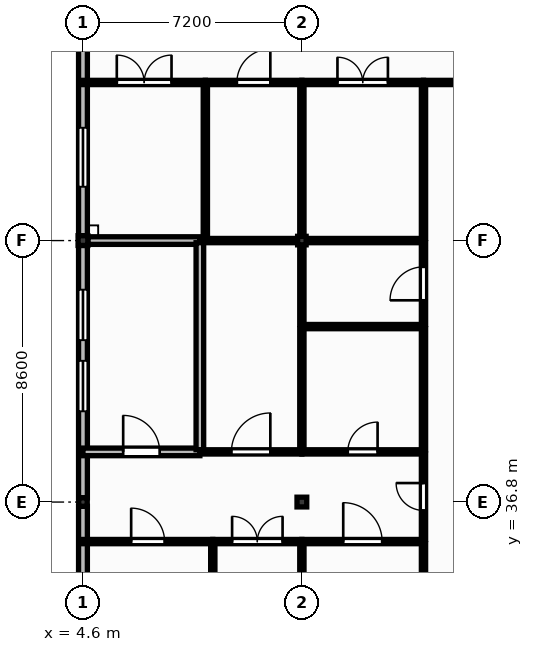
"""IFC4 building model, lengths in metres.
Left out: names, types, materials, properties, quantities, classifications, styles, units other than length and angle.
Written with IfcOpenShell. Run it as: python <this file> out.ifc"""

import sys

from ifc_helpers import new_model, si_unit, direction, frame, frame_2d, origin, origin_2d, place, context, subcontext, project, spatial, rectangle, extrude, element, fill, save


model = new_model("IFC4")
c1 = context("Model", 3, precision=1e-05, world=origin(), true_north=direction((0.0, 1.0)))
c2 = subcontext(c1, "Body", "Model", "MODEL_VIEW")
j1 = project(units=[si_unit("LENGTHUNIT", "METRE"), si_unit("PLANEANGLEUNIT", "RADIAN")], contexts=[c1])
p1 = place(None, origin())
s1 = spatial("IfcSite", under=j1, at=p1, CompositionType="ELEMENT")
p2 = place(p1, origin())
s2 = spatial("IfcBuilding", under=s1, at=p2, CompositionType="ELEMENT")
p3 = place(p2, frame((0.0, 0.0, 13.2)))
s3 = spatial("IfcBuildingStorey", under=s2, at=p3, CompositionType="ELEMENT", Elevation=13.2)
p4 = place(p3, frame((4.6, 36.8, 0.0), z_axis=(0.0, 0.0, 1.0), x_axis=(1.0, 0.0, 0.0)))
e1 = element("IfcColumn", 1, at=p4, inside=s3, PredefinedType="COLUMN", context=c2, shape_type="SweptSolid", body=[
    extrude(rectangle(XDim=0.28, YDim=0.28, at=origin_2d()), origin(), (0.0, 0.0, 1.0), 3.95),
])
p5 = place(p3, frame((4.6, 45.4, 0.0), z_axis=(0.0, 0.0, 1.0), x_axis=(1.0, 0.0, 0.0)))
e2 = element("IfcColumn", 2, at=p5, inside=s3, PredefinedType="COLUMN", context=c2, shape_type="SweptSolid", body=[
    extrude(rectangle(XDim=0.32, YDim=0.32, at=origin_2d()), origin(), (0.0, 0.0, 1.0), 3.98),
])
p6 = place(p3, frame((11.8, 36.8, 0.0), z_axis=(0.0, 0.0, 1.0), x_axis=(1.0, 0.0, 0.0)))
e3 = element("IfcColumn", 3, at=p6, inside=s3, PredefinedType="COLUMN", context=c2, shape_type="SweptSolid", body=[
    extrude(rectangle(XDim=0.32, YDim=0.32, at=origin_2d()), origin(), (0.0, 0.0, 1.0), 3.95),
])
p7 = place(p3, frame((11.8, 45.4, 0.0), z_axis=(0.0, 0.0, 1.0), x_axis=(1.0, 0.0, 0.0)))
e4 = element("IfcColumn", 4, at=p7, inside=s3, PredefinedType="COLUMN", context=c2, shape_type="SweptSolid", body=[
    extrude(rectangle(XDim=0.28, YDim=0.28, at=origin_2d()), origin(), (0.0, 0.0, 1.0), 3.98),
])
p8 = place(p3, frame((4.6, 27.36, 0.0), z_axis=(0.0, 0.0, 1.0), x_axis=(0.0, 1.0, 0.0)))
e5 = element("IfcWall", 5, at=p8, inside=s3, PredefinedType="SOLIDWALL", context=c2, shape_type="SweptSolid", body=[
    extrude(rectangle(XDim=9.3, YDim=0.29, at=frame_2d((4.65, 0.0))), origin(), (0.0, 0.0, 1.0), 3.49),
])
p9 = place(p8, frame((2.41, 0.0, 1.0)))
e6 = element("IfcOpeningElement", 6, at=p9, cuts=e5, PredefinedType="OPENING", context=c2, shape_type="SweptSolid", body=[
    extrude(rectangle(XDim=1.38, YDim=1.8, at=frame_2d((0.69, 0.9))), frame((0.0, 0.155, 0.0), z_axis=(0.0, -1.0, 0.0), x_axis=(1.0, 0.0, 0.0)), (0.0, 0.0, 1.0), 0.31),
])
p10 = place(p8, frame((4.47, 0.0, 1.0)))
e7 = element("IfcOpeningElement", 7, at=p10, cuts=e5, PredefinedType="OPENING", context=c2, shape_type="SweptSolid", body=[
    extrude(rectangle(XDim=1.38, YDim=1.8, at=frame_2d((0.69, 0.9))), frame((0.0, 0.155, 0.0), z_axis=(0.0, -1.0, 0.0), x_axis=(1.0, 0.0, 0.0)), (0.0, 0.0, 1.0), 0.31),
])
p11 = place(p3, frame((4.6, 36.94, 0.0), z_axis=(0.0, 0.0, 1.0), x_axis=(0.0, 1.0, 0.0)))
e8 = element("IfcWall", 8, at=p11, inside=s3, PredefinedType="SOLIDWALL", context=c2, shape_type="SweptSolid", body=[
    extrude(rectangle(XDim=8.3, YDim=0.29, at=frame_2d((4.15, 0.0))), origin(), (0.0, 0.0, 1.0), 3.49),
])
p12 = place(p11, frame((2.845, 0.0, 1.0)))
e9 = element("IfcOpeningElement", 9, at=p12, cuts=e8, PredefinedType="OPENING", context=c2, shape_type="SweptSolid", body=[
    extrude(rectangle(XDim=1.66, YDim=1.8, at=frame_2d((0.83, 0.9))), frame((0.0, 0.155, 0.0), z_axis=(0.0, -1.0, 0.0), x_axis=(1.0, 0.0, 0.0)), (0.0, 0.0, 1.0), 0.31),
])
p13 = place(p11, frame((5.185, 0.0, 1.0)))
e10 = element("IfcOpeningElement", 10, at=p13, cuts=e8, PredefinedType="OPENING", context=c2, shape_type="SweptSolid", body=[
    extrude(rectangle(XDim=1.66, YDim=1.8, at=frame_2d((0.83, 0.9))), frame((0.0, 0.155, 0.0), z_axis=(0.0, -1.0, 0.0), x_axis=(1.0, 0.0, 0.0)), (0.0, 0.0, 1.0), 0.31),
])
p14 = place(p3, frame((4.6, 45.56, 0.0), z_axis=(0.0, 0.0, 1.0), x_axis=(0.0, 1.0, 0.0)))
e11 = element("IfcWall", 11, at=p14, inside=s3, PredefinedType="SOLIDWALL", context=c2, shape_type="SweptSolid", body=[
    extrude(rectangle(XDim=6.9, YDim=0.29, at=frame_2d((3.45, 0.0))), origin(), (0.0, 0.0, 1.0), 3.52),
])
p15 = place(p14, frame((1.61, 0.0, 1.0)))
e12 = element("IfcOpeningElement", 12, at=p15, cuts=e11, PredefinedType="OPENING", context=c2, shape_type="SweptSolid", body=[
    extrude(rectangle(XDim=1.94, YDim=1.8, at=frame_2d((0.97, 0.9))), frame((0.0, 0.155, 0.0), z_axis=(0.0, -1.0, 0.0), x_axis=(1.0, 0.0, 0.0)), (0.0, 0.0, 1.0), 0.31),
])
p16 = place(p3, frame((4.6, 35.5, 0.0), z_axis=(0.0, 0.0, 1.0), x_axis=(1.0, 0.0, 0.0)))
e13 = element("IfcWall", 13, at=p16, inside=s3, PredefinedType="PARTITIONING", context=c2, shape_type="SweptSolid", body=[
    extrude(rectangle(XDim=4.27, YDim=0.14, at=frame_2d((2.135, 0.0))), origin(), (0.0, 0.0, 1.0), 3.93),
])
p17 = place(p16, frame((1.585, 0.0, 0.0)))
e14 = element("IfcOpeningElement", 14, at=p17, cuts=e13, PredefinedType="OPENING", context=c2, shape_type="SweptSolid", body=[
    extrude(rectangle(XDim=1.1, YDim=2.1, at=frame_2d((0.55, 1.05))), frame((0.0, 0.08, 0.0), z_axis=(0.0, -1.0, 0.0), x_axis=(1.0, 0.0, 0.0)), (0.0, 0.0, 1.0), 0.16),
])
p18 = place(p3, frame((4.6, 38.45, 0.0), z_axis=(0.0, 0.0, 1.0), x_axis=(1.0, 0.0, 0.0)))
e15 = element("IfcWall", 15, at=p18, inside=s3, PredefinedType="SOLIDWALL", context=c2, shape_type="SweptSolid", body=[
    extrude(rectangle(XDim=3.845, YDim=0.25, at=frame_2d((1.922, 0.0))), origin(), (0.0, 0.0, 1.0), 3.93),
])
p19 = place(p18, frame((1.323, 0.0, 0.0)))
e16 = element("IfcOpeningElement", 16, at=p19, cuts=e15, PredefinedType="OPENING", context=c2, shape_type="SweptSolid", body=[
    extrude(rectangle(XDim=1.2, YDim=2.15, at=frame_2d((0.6, 1.075))), frame((0.0, 0.135, 0.0), z_axis=(0.0, -1.0, 0.0), x_axis=(1.0, 0.0, 0.0)), (0.0, 0.0, 1.0), 0.27),
])
p20 = place(p3, frame((4.76, 45.4, 0.0), z_axis=(0.0, 0.0, 1.0), x_axis=(1.0, 0.0, 0.0)))
e17 = element("IfcWall", 17, at=p20, inside=s3, PredefinedType="SOLIDWALL", context=c2, shape_type="SweptSolid", body=[
    extrude(rectangle(XDim=3.685, YDim=0.25, at=frame_2d((1.843, 0.0))), origin(), (0.0, 0.0, 1.0), 3.52),
])
p21 = place(p3, frame((4.6, 50.6, 0.0), z_axis=(0.0, 0.0, 1.0), x_axis=(1.0, 0.0, 0.0)))
e18 = element("IfcWall", 18, at=p21, inside=s3, PredefinedType="PARTITIONING", context=c2, shape_type="SweptSolid", body=[
    extrude(rectangle(XDim=4.025, YDim=0.14, at=frame_2d((2.012, 0.0))), origin(), (0.0, 0.0, 1.0), 3.93),
])
p22 = place(p21, frame((1.113, 0.0, 0.0)))
e19 = element("IfcOpeningElement", 19, at=p22, cuts=e18, PredefinedType="OPENING", context=c2, shape_type="SweptSolid", body=[
    extrude(rectangle(XDim=1.8, YDim=2.3, at=frame_2d((0.9, 1.15))), frame((0.0, 0.08, 0.0), z_axis=(0.0, -1.0, 0.0), x_axis=(1.0, 0.0, 0.0)), (0.0, 0.0, 1.0), 0.16),
])
p23 = place(p3, frame((8.445, 38.52, 0.0), z_axis=(0.0, 0.0, 1.0), x_axis=(0.0, 1.0, 0.0)))
e20 = element("IfcWall", 20, at=p23, inside=s3, PredefinedType="SOLIDWALL", context=c2, shape_type="SweptSolid", body=[
    extrude(rectangle(XDim=6.81, YDim=0.25, at=frame_2d((3.405, 0.0))), origin(), (0.0, 0.0, 1.0), 3.93),
])
p24 = place(p3, frame((8.445, 38.45, 0.0), z_axis=(0.0, 0.0, 1.0), x_axis=(1.0, 0.0, 0.0)))
e21 = element("IfcWall", 21, at=p24, inside=s3, PredefinedType="PARTITIONING", context=c2, shape_type="SweptSolid", body=[
    extrude(rectangle(XDim=3.355, YDim=0.14, at=frame_2d((1.677, 0.0))), origin(), (0.0, 0.0, 1.0), 3.93),
])
p25 = place(p24, frame((1.038, 0.0, 0.0)))
e22 = element("IfcOpeningElement", 22, at=p25, cuts=e21, PredefinedType="OPENING", context=c2, shape_type="SweptSolid", body=[
    extrude(rectangle(XDim=1.28, YDim=2.2, at=frame_2d((0.64, 1.1))), frame((0.0, 0.08, 0.0), z_axis=(0.0, -1.0, 0.0), x_axis=(1.0, 0.0, 0.0)), (0.0, 0.0, 1.0), 0.16),
])
p26 = place(p3, frame((8.625, 45.47, 0.0), z_axis=(0.0, 0.0, 1.0), x_axis=(0.0, 1.0, 0.0)))
e23 = element("IfcWall", 23, at=p26, inside=s3, PredefinedType="PARTITIONING", context=c2, shape_type="SweptSolid", body=[
    extrude(rectangle(XDim=5.06, YDim=0.14, at=frame_2d((2.53, 0.0))), origin(), (0.0, 0.0, 1.0), 3.93),
])
p27 = place(p3, frame((8.625, 45.4, 0.0), z_axis=(0.0, 0.0, 1.0), x_axis=(1.0, 0.0, 0.0)))
e24 = element("IfcWall", 24, at=p27, inside=s3, PredefinedType="PARTITIONING", context=c2, shape_type="SweptSolid", body=[
    extrude(rectangle(XDim=3.035, YDim=0.14, at=frame_2d((1.518, 0.0))), origin(), (0.0, 0.0, 1.0), 3.52),
])
p28 = place(p3, frame((8.625, 50.6, 0.0), z_axis=(0.0, 0.0, 1.0), x_axis=(1.0, 0.0, 0.0)))
e25 = element("IfcWall", 25, at=p28, inside=s3, PredefinedType="PARTITIONING", context=c2, shape_type="SweptSolid", body=[
    extrude(rectangle(XDim=3.175, YDim=0.14, at=frame_2d((1.587, 0.0))), origin(), (0.0, 0.0, 1.0), 3.93),
])
p29 = place(p28, frame((1.038, 0.0, 0.0)))
e26 = element("IfcOpeningElement", 26, at=p29, cuts=e25, PredefinedType="OPENING", context=c2, shape_type="SweptSolid", body=[
    extrude(rectangle(XDim=1.1, YDim=2.1, at=frame_2d((0.55, 1.05))), frame((0.0, 0.08, 0.0), z_axis=(0.0, -1.0, 0.0), x_axis=(1.0, 0.0, 0.0)), (0.0, 0.0, 1.0), 0.16),
])
p30 = place(p3, frame((8.87, 27.2, 0.0), z_axis=(0.0, 0.0, 1.0), x_axis=(0.0, 1.0, 0.0)))
e27 = element("IfcWall", 27, at=p30, inside=s3, PredefinedType="PARTITIONING", context=c2, shape_type="SweptSolid", body=[
    extrude(rectangle(XDim=8.23, YDim=0.14, at=frame_2d((4.115, 0.0))), origin(), (0.0, 0.0, 1.0), 3.93),
])
p31 = place(p3, frame((8.87, 35.5, 0.0), z_axis=(0.0, 0.0, 1.0), x_axis=(1.0, 0.0, 0.0)))
e28 = element("IfcWall", 28, at=p31, inside=s3, PredefinedType="PARTITIONING", context=c2, shape_type="SweptSolid", body=[
    extrude(rectangle(XDim=2.93, YDim=0.14, at=frame_2d((1.465, 0.0))), origin(), (0.0, 0.0, 1.0), 3.93),
])
p32 = place(p31, frame((0.635, 0.0, 0.0)))
e29 = element("IfcOpeningElement", 29, at=p32, cuts=e28, PredefinedType="OPENING", context=c2, shape_type="SweptSolid", body=[
    extrude(rectangle(XDim=1.66, YDim=2.3, at=frame_2d((0.83, 1.15))), frame((0.0, 0.08, 0.0), z_axis=(0.0, -1.0, 0.0), x_axis=(1.0, 0.0, 0.0)), (0.0, 0.0, 1.0), 0.16),
])
p33 = place(p3, frame((11.8, 32.126, 0.0), z_axis=(0.0, 0.0, 1.0), x_axis=(0.0, 1.0, 0.0)))
e30 = element("IfcWall", 30, at=p33, inside=s3, PredefinedType="PARTITIONING", context=c2, shape_type="SweptSolid", body=[
    extrude(rectangle(XDim=3.304, YDim=0.14, at=frame_2d((1.652, 0.0))), origin(), (0.0, 0.0, 1.0), 3.49),
])
p34 = place(p3, frame((11.8, 35.5, 0.0), z_axis=(0.0, 0.0, 1.0), x_axis=(1.0, 0.0, 0.0)))
e31 = element("IfcWall", 31, at=p34, inside=s3, PredefinedType="PARTITIONING", context=c2, shape_type="SweptSolid", body=[
    extrude(rectangle(XDim=4.0, YDim=0.14, at=frame_2d((2.0, 0.0))), origin(), (0.0, 0.0, 1.0), 3.93),
])
p35 = place(p34, frame((1.36, 0.0, 0.0)))
e32 = element("IfcOpeningElement", 32, at=p35, cuts=e31, PredefinedType="OPENING", context=c2, shape_type="SweptSolid", body=[
    extrude(rectangle(XDim=1.28, YDim=2.2, at=frame_2d((0.64, 1.1))), frame((0.0, 0.08, 0.0), z_axis=(0.0, -1.0, 0.0), x_axis=(1.0, 0.0, 0.0)), (0.0, 0.0, 1.0), 0.16),
])
p36 = place(p3, frame((11.8, 38.52, 0.0), z_axis=(0.0, 0.0, 1.0), x_axis=(0.0, 1.0, 0.0)))
e33 = element("IfcWall", 33, at=p36, inside=s3, PredefinedType="PARTITIONING", context=c2, shape_type="SweptSolid", body=[
    extrude(rectangle(XDim=3.981, YDim=0.14, at=frame_2d((1.99, 0.0))), origin(), (0.0, 0.0, 1.0), 3.49),
])
p37 = place(p3, frame((11.8, 38.45, 0.0), z_axis=(0.0, 0.0, 1.0), x_axis=(1.0, 0.0, 0.0)))
e34 = element("IfcWall", 34, at=p37, inside=s3, PredefinedType="PARTITIONING", context=c2, shape_type="SweptSolid", body=[
    extrude(rectangle(XDim=4.0, YDim=0.14, at=frame_2d((2.0, 0.0))), origin(), (0.0, 0.0, 1.0), 3.93),
])
p38 = place(p37, frame((1.51, 0.0, 0.0)))
e35 = element("IfcOpeningElement", 35, at=p38, cuts=e34, PredefinedType="OPENING", context=c2, shape_type="SweptSolid", body=[
    extrude(rectangle(XDim=0.98, YDim=2.15, at=frame_2d((0.49, 1.075))), frame((0.0, 0.08, 0.0), z_axis=(0.0, -1.0, 0.0), x_axis=(1.0, 0.0, 0.0)), (0.0, 0.0, 1.0), 0.16),
])
p39 = place(p3, frame((11.8, 42.641, 0.0), z_axis=(0.0, 0.0, 1.0), x_axis=(0.0, 1.0, 0.0)))
e36 = element("IfcWall", 36, at=p39, inside=s3, PredefinedType="PARTITIONING", context=c2, shape_type="SweptSolid", body=[
    extrude(rectangle(XDim=2.619, YDim=0.14, at=frame_2d((1.31, 0.0))), origin(), (0.0, 0.0, 1.0), 3.49),
])
p40 = place(p3, frame((11.8, 42.571, 0.0), z_axis=(0.0, 0.0, 1.0), x_axis=(1.0, 0.0, 0.0)))
e37 = element("IfcWall", 37, at=p40, inside=s3, PredefinedType="PARTITIONING", context=c2, shape_type="SweptSolid", body=[
    extrude(rectangle(XDim=4.0, YDim=0.14, at=frame_2d((2.0, 0.0))), origin(), (0.0, 0.0, 1.0), 3.93),
])
p41 = place(p3, frame((11.8, 45.54, 0.0), z_axis=(0.0, 0.0, 1.0), x_axis=(0.0, 1.0, 0.0)))
e38 = element("IfcWall", 38, at=p41, inside=s3, PredefinedType="PARTITIONING", context=c2, shape_type="SweptSolid", body=[
    extrude(rectangle(XDim=4.99, YDim=0.14, at=frame_2d((2.495, 0.0))), origin(), (0.0, 0.0, 1.0), 3.46),
])
p42 = place(p3, frame((11.94, 45.4, 0.0), z_axis=(0.0, 0.0, 1.0), x_axis=(1.0, 0.0, 0.0)))
e39 = element("IfcWall", 39, at=p42, inside=s3, PredefinedType="PARTITIONING", context=c2, shape_type="SweptSolid", body=[
    extrude(rectangle(XDim=3.86, YDim=0.14, at=frame_2d((1.93, 0.0))), origin(), (0.0, 0.0, 1.0), 3.52),
])
p43 = place(p3, frame((11.8, 50.6, 0.0), z_axis=(0.0, 0.0, 1.0), x_axis=(1.0, 0.0, 0.0)))
e40 = element("IfcWall", 40, at=p43, inside=s3, PredefinedType="PARTITIONING", context=c2, shape_type="SweptSolid", body=[
    extrude(rectangle(XDim=4.0, YDim=0.14, at=frame_2d((2.0, 0.0))), origin(), (0.0, 0.0, 1.0), 3.93),
])
p44 = place(p43, frame((1.17, 0.0, 0.0)))
e41 = element("IfcOpeningElement", 41, at=p44, cuts=e40, PredefinedType="OPENING", context=c2, shape_type="SweptSolid", body=[
    extrude(rectangle(XDim=1.66, YDim=2.3, at=frame_2d((0.83, 1.15))), frame((0.0, 0.08, 0.0), z_axis=(0.0, -1.0, 0.0), x_axis=(1.0, 0.0, 0.0)), (0.0, 0.0, 1.0), 0.16),
])
p45 = place(p3, frame((15.8, 32.126, 0.0), z_axis=(0.0, 0.0, 1.0), x_axis=(0.0, 1.0, 0.0)))
e42 = element("IfcWall", 42, at=p45, inside=s3, PredefinedType="PARTITIONING", context=c2, shape_type="SweptSolid", body=[
    extrude(rectangle(XDim=3.304, YDim=0.14, at=frame_2d((1.652, 0.0))), origin(), (0.0, 0.0, 1.0), 3.93),
])
p46 = place(p3, frame((15.8, 35.57, 0.0), z_axis=(0.0, 0.0, 1.0), x_axis=(0.0, 1.0, 0.0)))
e43 = element("IfcWall", 43, at=p46, inside=s3, PredefinedType="PARTITIONING", context=c2, shape_type="SweptSolid", body=[
    extrude(rectangle(XDim=2.81, YDim=0.14, at=frame_2d((1.405, 0.0))), origin(), (0.0, 0.0, 1.0), 3.93),
])
p47 = place(p46, frame((0.955, 0.0, 0.0)))
e44 = element("IfcOpeningElement", 44, at=p47, cuts=e43, PredefinedType="OPENING", context=c2, shape_type="SweptSolid", body=[
    extrude(rectangle(XDim=0.9, YDim=2.1, at=frame_2d((0.45, 1.05))), frame((0.0, 0.08, 0.0), z_axis=(0.0, -1.0, 0.0), x_axis=(1.0, 0.0, 0.0)), (0.0, 0.0, 1.0), 0.16),
])
p48 = place(p3, frame((15.8, 38.52, 0.0), z_axis=(0.0, 0.0, 1.0), x_axis=(0.0, 1.0, 0.0)))
e45 = element("IfcWall", 45, at=p48, inside=s3, PredefinedType="PARTITIONING", context=c2, shape_type="SweptSolid", body=[
    extrude(rectangle(XDim=3.981, YDim=0.14, at=frame_2d((1.99, 0.0))), origin(), (0.0, 0.0, 1.0), 3.93),
])
p49 = place(p3, frame((15.8, 42.641, 0.0), z_axis=(0.0, 0.0, 1.0), x_axis=(0.0, 1.0, 0.0)))
e46 = element("IfcWall", 46, at=p49, inside=s3, PredefinedType="PARTITIONING", context=c2, shape_type="SweptSolid", body=[
    extrude(rectangle(XDim=2.689, YDim=0.14, at=frame_2d((1.344, 0.0))), origin(), (0.0, 0.0, 1.0), 3.93),
])
p50 = place(p49, frame((0.794, 0.0, 0.0)))
e47 = element("IfcOpeningElement", 47, at=p50, cuts=e46, PredefinedType="OPENING", context=c2, shape_type="SweptSolid", body=[
    extrude(rectangle(XDim=1.1, YDim=2.1, at=frame_2d((0.55, 1.05))), frame((0.0, 0.08, 0.0), z_axis=(0.0, -1.0, 0.0), x_axis=(1.0, 0.0, 0.0)), (0.0, 0.0, 1.0), 0.16),
])
p51 = place(p3, frame((15.8, 45.47, 0.0), z_axis=(0.0, 0.0, 1.0), x_axis=(0.0, 1.0, 0.0)))
e48 = element("IfcWall", 48, at=p51, inside=s3, PredefinedType="PARTITIONING", context=c2, shape_type="SweptSolid", body=[
    extrude(rectangle(XDim=5.06, YDim=0.14, at=frame_2d((2.53, 0.0))), origin(), (0.0, 0.0, 1.0), 3.93),
])
p52 = place(p3, frame((15.8, 50.6, 0.0), z_axis=(0.0, 0.0, 1.0), x_axis=(1.0, 0.0, 0.0)))
e49 = element("IfcWall", 49, at=p52, inside=s3, PredefinedType="PARTITIONING", context=c2, shape_type="SweptSolid", body=[
    extrude(rectangle(XDim=3.2, YDim=0.14, at=frame_2d((1.6, 0.0))), origin(), (0.0, 0.0, 1.0), 3.93),
])
p53 = place(p52, frame((1.08, 0.0, 0.0)))
e50 = element("IfcOpeningElement", 50, at=p53, cuts=e49, PredefinedType="OPENING", context=c2, shape_type="SweptSolid", body=[
    extrude(rectangle(XDim=1.04, YDim=2.1, at=frame_2d((0.52, 1.05))), frame((0.0, 0.08, 0.0), z_axis=(0.0, -1.0, 0.0), x_axis=(1.0, 0.0, 0.0)), (0.0, 0.0, 1.0), 0.16),
])
p54 = place(p12, origin())
e51 = element("IfcWindow", 51, at=p54, inside=s3, PartitioningType="DOUBLE_PANEL_VERTICAL", PredefinedType="WINDOW", context=c2, shape_type="SweptSolid", body=[
    extrude(rectangle(XDim=1.66, YDim=1.8, at=frame_2d((0.83, 0.9))), frame((0.0, 0.03, 0.0), z_axis=(0.0, -1.0, 0.0), x_axis=(1.0, 0.0, 0.0)), (0.0, 0.0, 1.0), 0.06),
])
fill(e9, e51)
p55 = place(p13, origin())
e52 = element("IfcWindow", 52, at=p55, inside=s3, PartitioningType="DOUBLE_PANEL_VERTICAL", PredefinedType="WINDOW", context=c2, shape_type="SweptSolid", body=[
    extrude(rectangle(XDim=1.66, YDim=1.8, at=frame_2d((0.83, 0.9))), frame((0.0, 0.03, 0.0), z_axis=(0.0, -1.0, 0.0), x_axis=(1.0, 0.0, 0.0)), (0.0, 0.0, 1.0), 0.06),
])
fill(e10, e52)
p56 = place(p15, origin())
e53 = element("IfcWindow", 53, at=p56, inside=s3, PartitioningType="DOUBLE_PANEL_VERTICAL", PredefinedType="WINDOW", context=c2, shape_type="SweptSolid", body=[
    extrude(rectangle(XDim=1.94, YDim=1.8, at=frame_2d((0.97, 0.9))), frame((0.0, 0.03, 0.0), z_axis=(0.0, -1.0, 0.0), x_axis=(1.0, 0.0, 0.0)), (0.0, 0.0, 1.0), 0.06),
])
fill(e12, e53)
p57 = place(p47, origin())
e54 = element("IfcDoor", 54, at=p57, inside=s3, OperationType="SINGLE_SWING_RIGHT", PredefinedType="DOOR", context=c2, shape_type="SweptSolid", body=[
    extrude(rectangle(XDim=0.9, YDim=2.1, at=frame_2d((0.45, 1.05))), frame((0.0, 0.025, 0.0), z_axis=(0.0, -1.0, 0.0), x_axis=(1.0, 0.0, 0.0)), (0.0, 0.0, 1.0), 0.05),
])
fill(e44, e54)
p58 = place(p17, origin())
e55 = element("IfcDoor", 55, at=p58, inside=s3, OperationType="SINGLE_SWING_LEFT", PredefinedType="DOOR", context=c2, shape_type="SweptSolid", body=[
    extrude(rectangle(XDim=1.1, YDim=2.1, at=frame_2d((0.55, 1.05))), frame((0.0, 0.025, 0.0), z_axis=(0.0, -1.0, 0.0), x_axis=(1.0, 0.0, 0.0)), (0.0, 0.0, 1.0), 0.05),
])
fill(e14, e55)
p59 = place(p32, origin())
e56 = element("IfcDoor", 56, at=p59, inside=s3, OperationType="DOUBLE_DOOR_SINGLE_SWING", PredefinedType="DOOR", context=c2, shape_type="SweptSolid", body=[
    extrude(rectangle(XDim=1.66, YDim=2.3, at=frame_2d((0.83, 1.15))), frame((0.0, 0.025, 0.0), z_axis=(0.0, -1.0, 0.0), x_axis=(1.0, 0.0, 0.0)), (0.0, 0.0, 1.0), 0.05),
])
fill(e29, e56)
p60 = place(p19, origin())
e57 = element("IfcDoor", 57, at=p60, inside=s3, OperationType="SINGLE_SWING_LEFT", PredefinedType="DOOR", context=c2, shape_type="SweptSolid", body=[
    extrude(rectangle(XDim=1.2, YDim=2.15, at=frame_2d((0.6, 1.075))), frame((0.0, 0.025, 0.0), z_axis=(0.0, -1.0, 0.0), x_axis=(1.0, 0.0, 0.0)), (0.0, 0.0, 1.0), 0.05),
])
fill(e16, e57)
p61 = place(p25, origin())
e58 = element("IfcDoor", 58, at=p61, inside=s3, OperationType="SINGLE_SWING_RIGHT", PredefinedType="DOOR", context=c2, shape_type="SweptSolid", body=[
    extrude(rectangle(XDim=1.28, YDim=2.2, at=frame_2d((0.64, 1.1))), frame((0.0, 0.025, 0.0), z_axis=(0.0, -1.0, 0.0), x_axis=(1.0, 0.0, 0.0)), (0.0, 0.0, 1.0), 0.05),
])
fill(e22, e58)
p62 = place(p22, origin())
e59 = element("IfcDoor", 59, at=p62, inside=s3, OperationType="DOUBLE_DOOR_SINGLE_SWING", PredefinedType="DOOR", context=c2, shape_type="SweptSolid", body=[
    extrude(rectangle(XDim=1.8, YDim=2.3, at=frame_2d((0.9, 1.15))), frame((0.0, 0.025, 0.0), z_axis=(0.0, -1.0, 0.0), x_axis=(1.0, 0.0, 0.0)), (0.0, 0.0, 1.0), 0.05),
])
fill(e19, e59)
p63 = place(p29, origin())
e60 = element("IfcDoor", 60, at=p63, inside=s3, OperationType="SINGLE_SWING_RIGHT", PredefinedType="DOOR", context=c2, shape_type="SweptSolid", body=[
    extrude(rectangle(XDim=1.1, YDim=2.1, at=frame_2d((0.55, 1.05))), frame((0.0, 0.025, 0.0), z_axis=(0.0, -1.0, 0.0), x_axis=(1.0, 0.0, 0.0)), (0.0, 0.0, 1.0), 0.05),
])
fill(e26, e60)
p64 = place(p35, origin())
e61 = element("IfcDoor", 61, at=p64, inside=s3, OperationType="SINGLE_SWING_LEFT", PredefinedType="DOOR", context=c2, shape_type="SweptSolid", body=[
    extrude(rectangle(XDim=1.28, YDim=2.2, at=frame_2d((0.64, 1.1))), frame((0.0, 0.025, 0.0), z_axis=(0.0, -1.0, 0.0), x_axis=(1.0, 0.0, 0.0)), (0.0, 0.0, 1.0), 0.05),
])
fill(e32, e61)
p65 = place(p38, origin())
e62 = element("IfcDoor", 62, at=p65, inside=s3, OperationType="SINGLE_SWING_RIGHT", PredefinedType="DOOR", context=c2, shape_type="SweptSolid", body=[
    extrude(rectangle(XDim=0.98, YDim=2.15, at=frame_2d((0.49, 1.075))), frame((0.0, 0.025, 0.0), z_axis=(0.0, -1.0, 0.0), x_axis=(1.0, 0.0, 0.0)), (0.0, 0.0, 1.0), 0.05),
])
fill(e35, e62)
p66 = place(p50, origin())
e63 = element("IfcDoor", 63, at=p66, inside=s3, OperationType="SINGLE_SWING_LEFT", PredefinedType="DOOR", context=c2, shape_type="SweptSolid", body=[
    extrude(rectangle(XDim=1.1, YDim=2.1, at=frame_2d((0.55, 1.05))), frame((0.0, 0.025, 0.0), z_axis=(0.0, -1.0, 0.0), x_axis=(1.0, 0.0, 0.0)), (0.0, 0.0, 1.0), 0.05),
])
fill(e47, e63)
p67 = place(p44, origin())
e64 = element("IfcDoor", 64, at=p67, inside=s3, OperationType="DOUBLE_DOOR_SINGLE_SWING", PredefinedType="DOOR", context=c2, shape_type="SweptSolid", body=[
    extrude(rectangle(XDim=1.66, YDim=2.3, at=frame_2d((0.83, 1.15))), frame((0.0, 0.025, 0.0), z_axis=(0.0, -1.0, 0.0), x_axis=(1.0, 0.0, 0.0)), (0.0, 0.0, 1.0), 0.05),
])
fill(e41, e64)
save(model, sys.argv[1])
